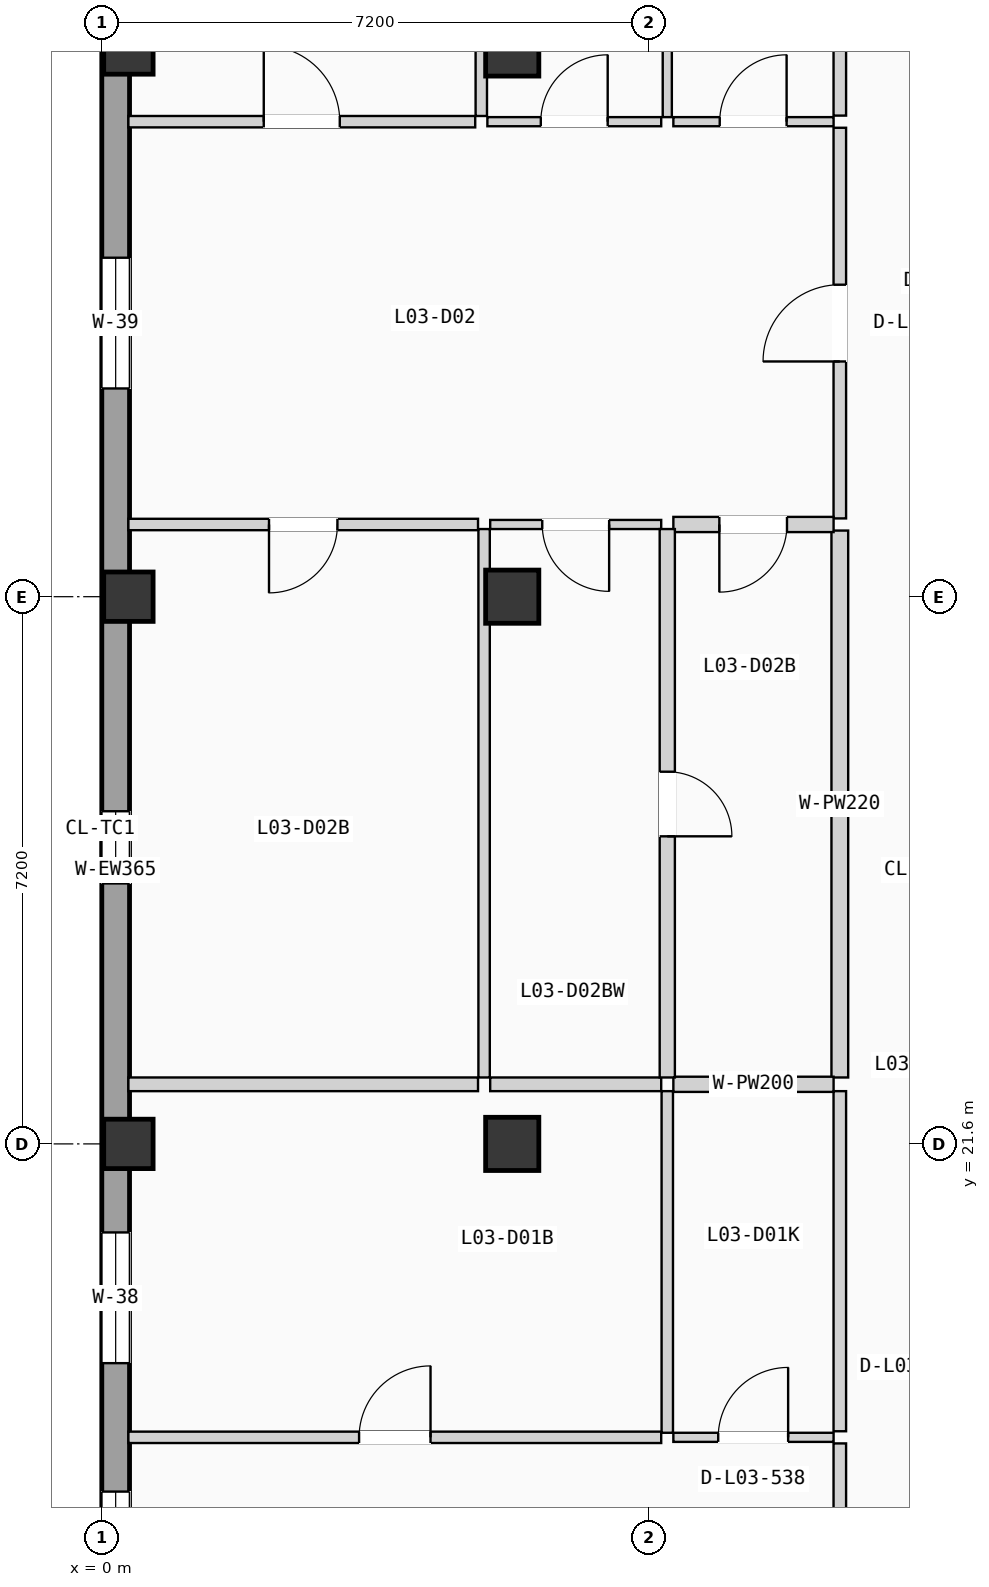
"""IFC4 building model, lengths in metres.
Left out: names, types, materials, properties, quantities, classifications, styles, units other than length and angle.
Written with IfcOpenShell. Run it as: python <this file> out.ifc"""

import sys

from ifc_helpers import new_model, si_unit, direction, frame, frame_2d, origin, origin_2d, place, context, subcontext, project, spatial, rectangle, extrude, element, fill, save


model = new_model("IFC4")
c1 = context("Model", 3, precision=1e-05, world=origin(), true_north=direction((0.0, 1.0)))
c2 = subcontext(c1, "Body", "Model", "MODEL_VIEW")
j1 = project(units=[si_unit("LENGTHUNIT", "METRE"), si_unit("PLANEANGLEUNIT", "RADIAN")], contexts=[c1])
p1 = place(None, origin())
s1 = spatial("IfcSite", under=j1, at=p1, CompositionType="ELEMENT")
p2 = place(p1, origin())
s2 = spatial("IfcBuilding", under=s1, at=p2, CompositionType="ELEMENT")
p3 = place(p2, frame((0.0, 0.0, 12.075)))
s3 = spatial("IfcBuildingStorey", under=s2, at=p3, CompositionType="ELEMENT", Elevation=12.075)
for number, where, z_axis, x_axis in (
    (1, (0.35, 21.6, 0.0), (0.0, 0.0, 1.0), (1.0, 0.0, 0.0)),
    (2, (0.35, 28.8, 0.0), (0.0, 0.0, 1.0), (1.0, 0.0, 0.0)),
    (3, (0.35, 36.0, 0.0), (0.0, 0.0, 1.0), (1.0, 0.0, 0.0)),
):
    element("IfcColumn", number, at=place(p3, frame(where, z_axis=z_axis, x_axis=x_axis)), inside=s3, PredefinedType="COLUMN", context=c2, shape_type="SweptSolid", body=[
        extrude(rectangle(XDim=0.65, YDim=0.65, at=origin_2d()), origin(), (0.0, 0.0, 1.0), 3.15),
    ])
for number, where, z_axis, x_axis in (
    (4, (5.4, 21.6, 0.0), (0.0, 0.0, 1.0), (1.0, 0.0, 0.0)),
    (5, (5.4, 28.8, 0.0), (0.0, 0.0, 1.0), (1.0, 0.0, 0.0)),
    (6, (5.4, 36.0, 0.0), (0.0, 0.0, 1.0), (1.0, 0.0, 0.0)),
):
    element("IfcColumn", number, at=place(p3, frame(where, z_axis=z_axis, x_axis=x_axis)), inside=s3, PredefinedType="COLUMN", context=c2, shape_type="SweptSolid", body=[
        extrude(rectangle(XDim=0.7, YDim=0.7, at=origin_2d()), origin(), (0.0, 0.0, 1.0), 3.15),
    ])
p4 = place(p3, frame((0.183, 0.365, 0.0), z_axis=(0.0, 0.0, 1.0), x_axis=(0.0, 1.0, 0.0)))
e7 = element("IfcWall", 7, at=p4, inside=s3, PredefinedType="SOLIDWALL", context=c2, shape_type="SweptSolid", body=[
    extrude(rectangle(XDim=49.67, YDim=0.365, at=frame_2d((24.835, 0.0))), origin(), (0.0, 0.0, 1.0), 2.89),
])
p5 = place(p4, frame((14.94, 0.0, 0.9)))
e8 = element("IfcOpeningElement", 8, at=p5, cuts=e7, PredefinedType="OPENING", context=c2, shape_type="SweptSolid", body=[
    extrude(rectangle(XDim=1.72, YDim=1.2, at=frame_2d((0.86, 0.6))), frame((0.0, 0.192, 0.0), z_axis=(0.0, -1.0, 0.0), x_axis=(1.0, 0.0, 0.0)), (0.0, 0.0, 1.0), 0.385),
])
p6 = place(p4, frame((8.612, 0.0, 0.855)))
e9 = element("IfcOpeningElement", 9, at=p6, cuts=e7, PredefinedType="OPENING", context=c2, shape_type="SweptSolid", body=[
    extrude(rectangle(XDim=1.72, YDim=1.35, at=frame_2d((0.86, 0.675))), frame((0.0, 0.192, 0.0), z_axis=(0.0, -1.0, 0.0), x_axis=(1.0, 0.0, 0.0)), (0.0, 0.0, 1.0), 0.385),
])
p7 = place(p4, frame((18.35, 0.0, 0.705)))
e10 = element("IfcOpeningElement", 10, at=p7, cuts=e7, PredefinedType="OPENING", context=c2, shape_type="SweptSolid", body=[
    extrude(rectangle(XDim=1.72, YDim=1.5, at=frame_2d((0.86, 0.75))), frame((0.0, 0.192, 0.0), z_axis=(0.0, -1.0, 0.0), x_axis=(1.0, 0.0, 0.0)), (0.0, 0.0, 1.0), 0.385),
])
p8 = place(p4, frame((31.175, 0.0, 0.555)))
e11 = element("IfcOpeningElement", 11, at=p8, cuts=e7, PredefinedType="OPENING", context=c2, shape_type="SweptSolid", body=[
    extrude(rectangle(XDim=1.72, YDim=1.65, at=frame_2d((0.86, 0.825))), frame((0.0, 0.192, 0.0), z_axis=(0.0, -1.0, 0.0), x_axis=(1.0, 0.0, 0.0)), (0.0, 0.0, 1.0), 0.385),
])
p9 = place(p4, frame((24.662, 0.0, 0.85)))
e12 = element("IfcOpeningElement", 12, at=p9, cuts=e7, PredefinedType="OPENING", context=c2, shape_type="SweptSolid", body=[
    extrude(rectangle(XDim=0.95, YDim=1.2, at=frame_2d((0.475, 0.6))), frame((0.0, 0.192, 0.0), z_axis=(0.0, -1.0, 0.0), x_axis=(1.0, 0.0, 0.0)), (0.0, 0.0, 1.0), 0.385),
])
p10 = place(p4, frame((38.245, 0.0, 0.9)))
e13 = element("IfcOpeningElement", 13, at=p10, cuts=e7, PredefinedType="OPENING", context=c2, shape_type="SweptSolid", body=[
    extrude(rectangle(XDim=1.85, YDim=1.2, at=frame_2d((0.925, 0.6))), frame((0.0, 0.192, 0.0), z_axis=(0.0, -1.0, 0.0), x_axis=(1.0, 0.0, 0.0)), (0.0, 0.0, 1.0), 0.385),
])
p11 = place(p3, frame((9.71, 12.235, 0.0), z_axis=(0.0, 0.0, 1.0), x_axis=(0.0, 1.0, 0.0)))
e14 = element("IfcWall", 14, at=p11, inside=s3, PredefinedType="PARTITIONING", context=c2, shape_type="SweptSolid", body=[
    extrude(rectangle(XDim=5.424, YDim=0.165, at=frame_2d((2.712, 0.0))), origin(), (0.0, 0.0, 1.0), 2.87),
])
p12 = place(p11, frame((2.207, 0.0, 0.0)))
e15 = element("IfcOpeningElement", 15, at=p12, cuts=e14, PredefinedType="OPENING", context=c2, shape_type="SweptSolid", body=[
    extrude(rectangle(XDim=1.01, YDim=2.11, at=frame_2d((0.505, 1.055))), frame((0.0, 0.093, 0.0), z_axis=(0.0, -1.0, 0.0), x_axis=(1.0, 0.0, 0.0)), (0.0, 0.0, 1.0), 0.185),
])
p13 = place(p3, frame((9.71, 17.819, 0.0), z_axis=(0.0, 0.0, 1.0), x_axis=(0.0, 1.0, 0.0)))
e16 = element("IfcWall", 16, at=p13, inside=s3, PredefinedType="PARTITIONING", context=c2, shape_type="SweptSolid", body=[
    extrude(rectangle(XDim=4.475, YDim=0.165, at=frame_2d((2.237, 0.0))), origin(), (0.0, 0.0, 1.0), 2.87),
])
p14 = place(p3, frame((9.71, 29.83, 0.0), z_axis=(0.0, 0.0, 1.0), x_axis=(0.0, 1.0, 0.0)))
e17 = element("IfcWall", 17, at=p14, inside=s3, PredefinedType="PARTITIONING", context=c2, shape_type="SweptSolid", body=[
    extrude(rectangle(XDim=5.14, YDim=0.165, at=frame_2d((2.57, 0.0))), origin(), (0.0, 0.0, 1.0), 2.87),
])
p15 = place(p14, frame((2.065, 0.0, 0.0)))
e18 = element("IfcOpeningElement", 18, at=p15, cuts=e17, PredefinedType="OPENING", context=c2, shape_type="SweptSolid", body=[
    extrude(rectangle(XDim=1.01, YDim=2.11, at=frame_2d((0.505, 1.055))), frame((0.0, 0.093, 0.0), z_axis=(0.0, -1.0, 0.0), x_axis=(1.0, 0.0, 0.0)), (0.0, 0.0, 1.0), 0.185),
])
p16 = place(p3, frame((9.71, 22.474, 0.0), z_axis=(0.0, 0.0, 1.0), x_axis=(0.0, 1.0, 0.0)))
e19 = element("IfcWall", 19, at=p16, inside=s3, PredefinedType="PLUMBINGWALL", context=c2, shape_type="SweptSolid", body=[
    extrude(rectangle(XDim=7.196, YDim=0.22, at=frame_2d((3.598, 0.0))), origin(), (0.0, 0.0, 1.0), 2.87),
])
p17 = place(p3, frame((9.71, 35.13, 0.0), z_axis=(0.0, 0.0, 1.0), x_axis=(0.0, 1.0, 0.0)))
e20 = element("IfcWall", 20, at=p17, inside=s3, PredefinedType="PARTITIONING", context=c2, shape_type="SweptSolid", body=[
    extrude(rectangle(XDim=7.67, YDim=0.165, at=frame_2d((3.835, 0.0))), origin(), (0.0, 0.0, 1.0), 2.87),
])
p18 = place(p3, frame((7.52, 17.739, 0.0), z_axis=(0.0, 0.0, 1.0), x_axis=(1.0, 0.0, 0.0)))
e21 = element("IfcWall", 21, at=p18, inside=s3, PredefinedType="PARTITIONING", context=c2, shape_type="SweptSolid", body=[
    extrude(rectangle(XDim=2.108, YDim=0.12, at=frame_2d((1.054, 0.0))), origin(), (0.0, 0.0, 1.0), 2.87),
])
p19 = place(p18, frame((0.59, 0.0, 0.0)))
e22 = element("IfcOpeningElement", 22, at=p19, cuts=e21, PredefinedType="OPENING", context=c2, shape_type="SweptSolid", body=[
    extrude(rectangle(XDim=0.92, YDim=2.02, at=frame_2d((0.46, 1.01))), frame((0.0, 0.07, 0.0), z_axis=(0.0, -1.0, 0.0), x_axis=(1.0, 0.0, 0.0)), (0.0, 0.0, 1.0), 0.14),
])
p20 = place(p3, frame((0.35, 17.739, 0.0), z_axis=(0.0, 0.0, 1.0), x_axis=(1.0, 0.0, 0.0)))
e23 = element("IfcWall", 23, at=p20, inside=s3, PredefinedType="PARTITIONING", context=c2, shape_type="SweptSolid", body=[
    extrude(rectangle(XDim=7.01, YDim=0.15, at=frame_2d((3.505, 0.0))), origin(), (0.0, 0.0, 1.0), 2.87),
])
p21 = place(p20, frame((3.035, 0.0, 0.0)))
e24 = element("IfcOpeningElement", 24, at=p21, cuts=e23, PredefinedType="OPENING", context=c2, shape_type="SweptSolid", body=[
    extrude(rectangle(XDim=0.94, YDim=2.06, at=frame_2d((0.47, 1.03))), frame((0.0, 0.085, 0.0), z_axis=(0.0, -1.0, 0.0), x_axis=(1.0, 0.0, 0.0)), (0.0, 0.0, 1.0), 0.17),
])
p22 = place(p3, frame((7.44, 17.799, 0.0), z_axis=(0.0, 0.0, 1.0), x_axis=(0.0, 1.0, 0.0)))
e25 = element("IfcWall", 25, at=p22, inside=s3, PredefinedType="PARTITIONING", context=c2, shape_type="SweptSolid", body=[
    extrude(rectangle(XDim=4.495, YDim=0.15, at=frame_2d((2.248, 0.0))), origin(), (0.0, 0.0, 1.0), 2.87),
])
p23 = place(p3, frame((7.52, 22.384, 0.0), z_axis=(0.0, 0.0, 1.0), x_axis=(1.0, 0.0, 0.0)))
e26 = element("IfcWall", 26, at=p23, inside=s3, PredefinedType="PLUMBINGWALL", context=c2, shape_type="SweptSolid", body=[
    extrude(rectangle(XDim=2.108, YDim=0.2, at=frame_2d((1.054, 0.0))), origin(), (0.0, 0.0, 1.0), 2.87),
])
p24 = place(p3, frame((0.35, 22.384, 0.0), z_axis=(0.0, 0.0, 1.0), x_axis=(1.0, 0.0, 0.0)))
e27 = element("IfcWall", 27, at=p24, inside=s3, PredefinedType="PARTITIONING", context=c2, shape_type="SweptSolid", body=[
    extrude(rectangle(XDim=4.6, YDim=0.18, at=frame_2d((2.3, 0.0))), origin(), (0.0, 0.0, 1.0), 2.87),
])
p25 = place(p3, frame((5.11, 22.384, 0.0), z_axis=(0.0, 0.0, 1.0), x_axis=(1.0, 0.0, 0.0)))
e28 = element("IfcWall", 28, at=p25, inside=s3, PredefinedType="PARTITIONING", context=c2, shape_type="SweptSolid", body=[
    extrude(rectangle(XDim=2.25, YDim=0.18, at=frame_2d((1.125, 0.0))), origin(), (0.0, 0.0, 1.0), 2.87),
])
p26 = place(p3, frame((7.52, 29.75, 0.0), z_axis=(0.0, 0.0, 1.0), x_axis=(1.0, 0.0, 0.0)))
e29 = element("IfcWall", 29, at=p26, inside=s3, PredefinedType="PLUMBINGWALL", context=c2, shape_type="SweptSolid", body=[
    extrude(rectangle(XDim=2.108, YDim=0.2, at=frame_2d((1.054, 0.0))), origin(), (0.0, 0.0, 1.0), 2.87),
])
p27 = place(p26, frame((0.605, 0.0, 0.0)))
e30 = element("IfcOpeningElement", 30, at=p27, cuts=e29, PredefinedType="OPENING", context=c2, shape_type="SweptSolid", body=[
    extrude(rectangle(XDim=0.89, YDim=2.03, at=frame_2d((0.445, 1.015))), frame((0.0, 0.11, 0.0), z_axis=(0.0, -1.0, 0.0), x_axis=(1.0, 0.0, 0.0)), (0.0, 0.0, 1.0), 0.22),
])
p28 = place(p3, frame((7.52, 35.05, 0.0), z_axis=(0.0, 0.0, 1.0), x_axis=(1.0, 0.0, 0.0)))
e31 = element("IfcWall", 31, at=p28, inside=s3, PredefinedType="PARTITIONING", context=c2, shape_type="SweptSolid", body=[
    extrude(rectangle(XDim=2.108, YDim=0.12, at=frame_2d((1.054, 0.0))), origin(), (0.0, 0.0, 1.0), 2.87),
])
p29 = place(p28, frame((0.61, 0.0, 0.0)))
e32 = element("IfcOpeningElement", 32, at=p29, cuts=e31, PredefinedType="OPENING", context=c2, shape_type="SweptSolid", body=[
    extrude(rectangle(XDim=0.88, YDim=2.02, at=frame_2d((0.44, 1.01))), frame((0.0, 0.07, 0.0), z_axis=(0.0, -1.0, 0.0), x_axis=(1.0, 0.0, 0.0)), (0.0, 0.0, 1.0), 0.14),
])
p30 = place(p3, frame((0.35, 29.75, 0.0), z_axis=(0.0, 0.0, 1.0), x_axis=(1.0, 0.0, 0.0)))
e33 = element("IfcWall", 33, at=p30, inside=s3, PredefinedType="PARTITIONING", context=c2, shape_type="SweptSolid", body=[
    extrude(rectangle(XDim=4.6, YDim=0.15, at=frame_2d((2.3, 0.0))), origin(), (0.0, 0.0, 1.0), 2.87),
])
p31 = place(p30, frame((1.85, 0.0, 0.0)))
e34 = element("IfcOpeningElement", 34, at=p31, cuts=e33, PredefinedType="OPENING", context=c2, shape_type="SweptSolid", body=[
    extrude(rectangle(XDim=0.9, YDim=2.04, at=frame_2d((0.45, 1.02))), frame((0.0, 0.085, 0.0), z_axis=(0.0, -1.0, 0.0), x_axis=(1.0, 0.0, 0.0)), (0.0, 0.0, 1.0), 0.17),
])
p32 = place(p3, frame((5.11, 29.75, 0.0), z_axis=(0.0, 0.0, 1.0), x_axis=(1.0, 0.0, 0.0)))
e35 = element("IfcWall", 35, at=p32, inside=s3, PredefinedType="PARTITIONING", context=c2, shape_type="SweptSolid", body=[
    extrude(rectangle(XDim=2.25, YDim=0.12, at=frame_2d((1.125, 0.0))), origin(), (0.0, 0.0, 1.0), 2.87),
])
p33 = place(p32, frame((0.685, 0.0, 0.0)))
e36 = element("IfcOpeningElement", 36, at=p33, cuts=e35, PredefinedType="OPENING", context=c2, shape_type="SweptSolid", body=[
    extrude(rectangle(XDim=0.88, YDim=2.02, at=frame_2d((0.44, 1.01))), frame((0.0, 0.07, 0.0), z_axis=(0.0, -1.0, 0.0), x_axis=(1.0, 0.0, 0.0)), (0.0, 0.0, 1.0), 0.14),
])
p34 = place(p3, frame((0.35, 35.05, 0.0), z_axis=(0.0, 0.0, 1.0), x_axis=(1.0, 0.0, 0.0)))
e37 = element("IfcWall", 37, at=p34, inside=s3, PredefinedType="PARTITIONING", context=c2, shape_type="SweptSolid", body=[
    extrude(rectangle(XDim=4.563, YDim=0.15, at=frame_2d((2.281, 0.0))), origin(), (0.0, 0.0, 1.0), 2.87),
])
p35 = place(p34, frame((1.781, 0.0, 0.0)))
e38 = element("IfcOpeningElement", 38, at=p35, cuts=e37, PredefinedType="OPENING", context=c2, shape_type="SweptSolid", body=[
    extrude(rectangle(XDim=1.0, YDim=2.06, at=frame_2d((0.5, 1.03))), frame((0.0, 0.085, 0.0), z_axis=(0.0, -1.0, 0.0), x_axis=(1.0, 0.0, 0.0)), (0.0, 0.0, 1.0), 0.17),
])
p36 = place(p3, frame((5.073, 35.05, 0.0), z_axis=(0.0, 0.0, 1.0), x_axis=(1.0, 0.0, 0.0)))
e39 = element("IfcWall", 39, at=p36, inside=s3, PredefinedType="PARTITIONING", context=c2, shape_type="SweptSolid", body=[
    extrude(rectangle(XDim=2.287, YDim=0.12, at=frame_2d((1.144, 0.0))), origin(), (0.0, 0.0, 1.0), 2.87),
])
p37 = place(p36, frame((0.703, 0.0, 0.0)))
e40 = element("IfcOpeningElement", 40, at=p37, cuts=e39, PredefinedType="OPENING", context=c2, shape_type="SweptSolid", body=[
    extrude(rectangle(XDim=0.88, YDim=2.02, at=frame_2d((0.44, 1.01))), frame((0.0, 0.07, 0.0), z_axis=(0.0, -1.0, 0.0), x_axis=(1.0, 0.0, 0.0)), (0.0, 0.0, 1.0), 0.14),
])
p38 = place(p3, frame((7.44, 22.474, 0.0), z_axis=(0.0, 0.0, 1.0), x_axis=(0.0, 1.0, 0.0)))
e41 = element("IfcWall", 41, at=p38, inside=s3, PredefinedType="PLUMBINGWALL", context=c2, shape_type="SweptSolid", body=[
    extrude(rectangle(XDim=7.216, YDim=0.2, at=frame_2d((3.608, 0.0))), origin(), (0.0, 0.0, 1.0), 2.87),
])
p39 = place(p38, frame((3.173, 0.0, 0.0)))
e42 = element("IfcOpeningElement", 42, at=p39, cuts=e41, PredefinedType="OPENING", context=c2, shape_type="SweptSolid", body=[
    extrude(rectangle(XDim=0.85, YDim=2.01, at=frame_2d((0.425, 1.005))), frame((0.0, 0.11, 0.0), z_axis=(0.0, -1.0, 0.0), x_axis=(1.0, 0.0, 0.0)), (0.0, 0.0, 1.0), 0.22),
])
p40 = place(p3, frame((7.44, 35.11, 0.0), z_axis=(0.0, 0.0, 1.0), x_axis=(0.0, 1.0, 0.0)))
e43 = element("IfcWall", 43, at=p40, inside=s3, PredefinedType="PARTITIONING", context=c2, shape_type="SweptSolid", body=[
    extrude(rectangle(XDim=7.69, YDim=0.12, at=frame_2d((3.845, 0.0))), origin(), (0.0, 0.0, 1.0), 2.87),
])
p41 = place(p3, frame((5.03, 22.474, 0.0), z_axis=(0.0, 0.0, 1.0), x_axis=(0.0, 1.0, 0.0)))
e44 = element("IfcWall", 44, at=p41, inside=s3, PredefinedType="PARTITIONING", context=c2, shape_type="SweptSolid", body=[
    extrude(rectangle(XDim=7.216, YDim=0.15, at=frame_2d((3.608, 0.0))), origin(), (0.0, 0.0, 1.0), 2.87),
])
p42 = place(p3, frame((4.993, 35.125, 0.0), z_axis=(0.0, 0.0, 1.0), x_axis=(0.0, 1.0, 0.0)))
e45 = element("IfcWall", 45, at=p42, inside=s3, PredefinedType="PARTITIONING", context=c2, shape_type="SweptSolid", body=[
    extrude(rectangle(XDim=7.675, YDim=0.15, at=frame_2d((3.837, 0.0))), origin(), (0.0, 0.0, 1.0), 2.87),
])
p43 = place(p5, origin())
e46 = element("IfcWindow", 46, at=p43, inside=s3, PartitioningType="DOUBLE_PANEL_VERTICAL", PredefinedType="WINDOW", context=c2, shape_type="SweptSolid", body=[
    extrude(rectangle(XDim=1.72, YDim=1.2, at=frame_2d((0.86, 0.6))), frame((0.0, 0.03, 0.0), z_axis=(0.0, -1.0, 0.0), x_axis=(1.0, 0.0, 0.0)), (0.0, 0.0, 1.0), 0.06),
])
fill(e8, e46)
p44 = place(p7, origin())
e47 = element("IfcWindow", 47, at=p44, inside=s3, PartitioningType="DOUBLE_PANEL_VERTICAL", PredefinedType="WINDOW", context=c2, shape_type="SweptSolid", body=[
    extrude(rectangle(XDim=1.72, YDim=1.5, at=frame_2d((0.86, 0.75))), frame((0.0, 0.03, 0.0), z_axis=(0.0, -1.0, 0.0), x_axis=(1.0, 0.0, 0.0)), (0.0, 0.0, 1.0), 0.06),
])
fill(e10, e47)
p45 = place(p8, origin())
e48 = element("IfcWindow", 48, at=p45, inside=s3, PartitioningType="DOUBLE_PANEL_VERTICAL", PredefinedType="WINDOW", context=c2, shape_type="SweptSolid", body=[
    extrude(rectangle(XDim=1.72, YDim=1.65, at=frame_2d((0.86, 0.825))), frame((0.0, 0.03, 0.0), z_axis=(0.0, -1.0, 0.0), x_axis=(1.0, 0.0, 0.0)), (0.0, 0.0, 1.0), 0.06),
])
fill(e11, e48)
p46 = place(p9, origin())
e49 = element("IfcWindow", 49, at=p46, inside=s3, PartitioningType="SINGLE_PANEL", PredefinedType="WINDOW", context=c2, shape_type="SweptSolid", body=[
    extrude(rectangle(XDim=0.95, YDim=1.2, at=frame_2d((0.475, 0.6))), frame((0.0, 0.03, 0.0), z_axis=(0.0, -1.0, 0.0), x_axis=(1.0, 0.0, 0.0)), (0.0, 0.0, 1.0), 0.06),
])
fill(e12, e49)
p47 = place(p15, origin())
e50 = element("IfcDoor", 50, at=p47, inside=s3, OperationType="SINGLE_SWING_LEFT", PredefinedType="DOOR", context=c2, shape_type="SweptSolid", body=[
    extrude(rectangle(XDim=1.01, YDim=2.11, at=frame_2d((0.505, 1.055))), frame((0.0, 0.025, 0.0), z_axis=(0.0, -1.0, 0.0), x_axis=(1.0, 0.0, 0.0)), (0.0, 0.0, 1.0), 0.05),
])
fill(e18, e50)
p48 = place(p19, origin())
e51 = element("IfcDoor", 51, at=p48, inside=s3, OperationType="SINGLE_SWING_RIGHT", PredefinedType="DOOR", context=c2, shape_type="SweptSolid", body=[
    extrude(rectangle(XDim=0.92, YDim=2.02, at=frame_2d((0.46, 1.01))), frame((0.0, 0.025, 0.0), z_axis=(0.0, -1.0, 0.0), x_axis=(1.0, 0.0, 0.0)), (0.0, 0.0, 1.0), 0.05),
])
fill(e22, e51)
p49 = place(p21, origin())
e52 = element("IfcDoor", 52, at=p49, inside=s3, OperationType="SINGLE_SWING_RIGHT", PredefinedType="DOOR", context=c2, shape_type="SweptSolid", body=[
    extrude(rectangle(XDim=0.94, YDim=2.06, at=frame_2d((0.47, 1.03))), frame((0.0, 0.025, 0.0), z_axis=(0.0, -1.0, 0.0), x_axis=(1.0, 0.0, 0.0)), (0.0, 0.0, 1.0), 0.05),
])
fill(e24, e52)
p50 = place(p27, frame((0.89, 0.0, 0.0), z_axis=(0.0, 0.0, 1.0), x_axis=(-1.0, 0.0, 0.0)))
e53 = element("IfcDoor", 53, at=p50, inside=s3, OperationType="SINGLE_SWING_LEFT", PredefinedType="DOOR", context=c2, shape_type="SweptSolid", body=[
    extrude(rectangle(XDim=0.89, YDim=2.03, at=frame_2d((0.445, 1.015))), frame((0.0, 0.025, 0.0), z_axis=(0.0, -1.0, 0.0), x_axis=(1.0, 0.0, 0.0)), (0.0, 0.0, 1.0), 0.05),
])
fill(e30, e53)
p51 = place(p29, origin())
e54 = element("IfcDoor", 54, at=p51, inside=s3, OperationType="SINGLE_SWING_RIGHT", PredefinedType="DOOR", context=c2, shape_type="SweptSolid", body=[
    extrude(rectangle(XDim=0.88, YDim=2.02, at=frame_2d((0.44, 1.01))), frame((0.0, 0.025, 0.0), z_axis=(0.0, -1.0, 0.0), x_axis=(1.0, 0.0, 0.0)), (0.0, 0.0, 1.0), 0.05),
])
fill(e32, e54)
p52 = place(p31, frame((0.9, 0.0, 0.0), z_axis=(0.0, 0.0, 1.0), x_axis=(-1.0, 0.0, 0.0)))
e55 = element("IfcDoor", 55, at=p52, inside=s3, OperationType="SINGLE_SWING_LEFT", PredefinedType="DOOR", context=c2, shape_type="SweptSolid", body=[
    extrude(rectangle(XDim=0.9, YDim=2.04, at=frame_2d((0.45, 1.02))), frame((0.0, 0.025, 0.0), z_axis=(0.0, -1.0, 0.0), x_axis=(1.0, 0.0, 0.0)), (0.0, 0.0, 1.0), 0.05),
])
fill(e34, e55)
p53 = place(p33, frame((0.88, 0.0, 0.0), z_axis=(0.0, 0.0, 1.0), x_axis=(-1.0, 0.0, 0.0)))
e56 = element("IfcDoor", 56, at=p53, inside=s3, OperationType="SINGLE_SWING_RIGHT", PredefinedType="DOOR", context=c2, shape_type="SweptSolid", body=[
    extrude(rectangle(XDim=0.88, YDim=2.02, at=frame_2d((0.44, 1.01))), frame((0.0, 0.025, 0.0), z_axis=(0.0, -1.0, 0.0), x_axis=(1.0, 0.0, 0.0)), (0.0, 0.0, 1.0), 0.05),
])
fill(e36, e56)
p54 = place(p35, origin())
e57 = element("IfcDoor", 57, at=p54, inside=s3, OperationType="SINGLE_SWING_LEFT", PredefinedType="DOOR", context=c2, shape_type="SweptSolid", body=[
    extrude(rectangle(XDim=1.0, YDim=2.06, at=frame_2d((0.5, 1.03))), frame((0.0, 0.025, 0.0), z_axis=(0.0, -1.0, 0.0), x_axis=(1.0, 0.0, 0.0)), (0.0, 0.0, 1.0), 0.05),
])
fill(e38, e57)
p55 = place(p37, origin())
e58 = element("IfcDoor", 58, at=p55, inside=s3, OperationType="SINGLE_SWING_RIGHT", PredefinedType="DOOR", context=c2, shape_type="SweptSolid", body=[
    extrude(rectangle(XDim=0.88, YDim=2.02, at=frame_2d((0.44, 1.01))), frame((0.0, 0.025, 0.0), z_axis=(0.0, -1.0, 0.0), x_axis=(1.0, 0.0, 0.0)), (0.0, 0.0, 1.0), 0.05),
])
fill(e40, e58)
p56 = place(p39, frame((0.85, 0.0, 0.0), z_axis=(0.0, 0.0, 1.0), x_axis=(-1.0, 0.0, 0.0)))
e59 = element("IfcDoor", 59, at=p56, inside=s3, OperationType="SINGLE_SWING_LEFT", PredefinedType="DOOR", context=c2, shape_type="SweptSolid", body=[
    extrude(rectangle(XDim=0.85, YDim=2.01, at=frame_2d((0.425, 1.005))), frame((0.0, 0.025, 0.0), z_axis=(0.0, -1.0, 0.0), x_axis=(1.0, 0.0, 0.0)), (0.0, 0.0, 1.0), 0.05),
])
fill(e42, e59)
save(model, sys.argv[1])
